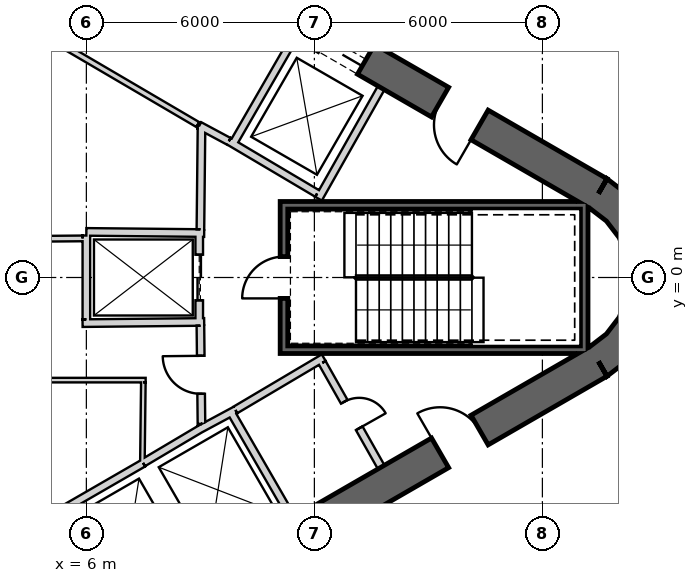
"""IFC4 building model, lengths in metres.
Left out: names, types, materials, properties, quantities, classifications, styles, units other than length and angle.
Written with IfcOpenShell. Run it as: python <this file> out.ifc"""

import sys

from ifc_helpers import new_model, si_unit, direction, frame, frame_2d, origin, place, context, subcontext, project, spatial, polyline, rectangle, outline, extrude, element, fill, save


model = new_model("IFC4")
c1 = context("Model", 3, precision=1e-05, world=origin(), true_north=direction((0.0, 1.0)))
c2 = subcontext(c1, "Body", "Model", "MODEL_VIEW")
j1 = project(units=[si_unit("LENGTHUNIT", "METRE"), si_unit("PLANEANGLEUNIT", "RADIAN")], contexts=[c1])
p1 = place(None, origin())
s1 = spatial("IfcSite", under=j1, at=p1, CompositionType="ELEMENT")
p2 = place(p1, origin())
s2 = spatial("IfcBuilding", under=s1, at=p2, CompositionType="ELEMENT")
p3 = place(p2, frame((0.0, 0.0, 181.2)))
s3 = spatial("IfcBuildingStorey", under=s2, at=p3, CompositionType="ELEMENT", Elevation=181.2)
p4 = place(p3, frame((19.475, 2.208, 0.0), z_axis=(0.0, 0.0, 1.0), x_axis=(-0.866028369851, 0.499994862586, 0.0)))
e1 = element("IfcWall", 1, at=p4, inside=s3, PredefinedType="SHEAR", context=c2, shape_type="SweptSolid", body=[
    extrude(rectangle(XDim=31.523, YDim=0.9, at=frame_2d((15.762, 0.0))), origin(), (0.0, 0.0, 1.0), 4.0),
])
p5 = place(p4, frame((7.062, 0.0, 0.0)))
e2 = element("IfcOpeningElement", 2, at=p5, cuts=e1, PredefinedType="OPENING", context=c2, shape_type="SweptSolid", body=[
    extrude(rectangle(XDim=1.2, YDim=2.4, at=frame_2d((0.6, 1.2))), frame((0.0, 0.46, 0.0), z_axis=(0.0, -1.0, 0.0), x_axis=(1.0, 0.0, 0.0)), (0.0, 0.0, 1.0), 0.92),
])
p6 = place(p4, frame((3.612, 0.0, 0.0)))
e3 = element("IfcOpeningElement", 3, at=p6, cuts=e1, PredefinedType="OPENING", context=c2, shape_type="SweptSolid", body=[
    extrude(rectangle(XDim=1.2, YDim=2.4, at=frame_2d((0.6, 1.2))), frame((0.0, 0.46, 0.0), z_axis=(0.0, -1.0, 0.0), x_axis=(1.0, 0.0, 0.0)), (0.0, 0.0, 1.0), 0.92),
])
p7 = place(p4, frame((26.712, 0.0, 0.0)))
e4 = element("IfcOpeningElement", 4, at=p7, cuts=e1, PredefinedType="OPENING", context=c2, shape_type="SweptSolid", body=[
    extrude(rectangle(XDim=1.2, YDim=2.4, at=frame_2d((0.6, 1.2))), frame((0.0, 0.46, 0.0), z_axis=(0.0, -1.0, 0.0), x_axis=(1.0, 0.0, 0.0)), (0.0, 0.0, 1.0), 0.92),
])
p8 = place(p3, frame((-7.825, -17.97, 0.0), z_axis=(0.0, 0.0, 1.0), x_axis=(0.866028369851, 0.499994862586, 0.0)))
e5 = element("IfcWall", 5, at=p8, inside=s3, PredefinedType="SHEAR", context=c2, shape_type="SweptSolid", body=[
    extrude(rectangle(XDim=31.523, YDim=0.9, at=frame_2d((15.762, 0.0))), origin(), (0.0, 0.0, 1.0), 4.0),
])
p9 = place(p8, frame((7.062, 0.0, 0.0)))
e6 = element("IfcOpeningElement", 6, at=p9, cuts=e5, PredefinedType="OPENING", context=c2, shape_type="SweptSolid", body=[
    extrude(rectangle(XDim=1.2, YDim=2.4, at=frame_2d((0.6, 1.2))), frame((0.0, 0.46, 0.0), z_axis=(0.0, -1.0, 0.0), x_axis=(1.0, 0.0, 0.0)), (0.0, 0.0, 1.0), 0.92),
])
p10 = place(p8, frame((9.762, 0.0, 0.0)))
e7 = element("IfcOpeningElement", 7, at=p10, cuts=e5, PredefinedType="OPENING", context=c2, shape_type="SweptSolid", body=[
    extrude(rectangle(XDim=1.2, YDim=2.4, at=frame_2d((0.6, 1.2))), frame((0.0, 0.46, 0.0), z_axis=(0.0, -1.0, 0.0), x_axis=(1.0, 0.0, 0.0)), (0.0, 0.0, 1.0), 0.92),
])
p11 = place(p8, frame((12.462, 0.0, 0.0)))
e8 = element("IfcOpeningElement", 8, at=p11, cuts=e5, PredefinedType="OPENING", context=c2, shape_type="SweptSolid", body=[
    extrude(rectangle(XDim=1.2, YDim=2.4, at=frame_2d((0.6, 1.2))), frame((0.0, 0.46, 0.0), z_axis=(0.0, -1.0, 0.0), x_axis=(1.0, 0.0, 0.0)), (0.0, 0.0, 1.0), 0.92),
])
p12 = place(p8, frame((15.162, 0.0, 0.0)))
e9 = element("IfcOpeningElement", 9, at=p12, cuts=e5, PredefinedType="OPENING", context=c2, shape_type="SweptSolid", body=[
    extrude(rectangle(XDim=1.2, YDim=2.4, at=frame_2d((0.6, 1.2))), frame((0.0, 0.46, 0.0), z_axis=(0.0, -1.0, 0.0), x_axis=(1.0, 0.0, 0.0)), (0.0, 0.0, 1.0), 0.92),
])
p13 = place(p8, frame((17.862, 0.0, 0.0)))
e10 = element("IfcOpeningElement", 10, at=p13, cuts=e5, PredefinedType="OPENING", context=c2, shape_type="SweptSolid", body=[
    extrude(rectangle(XDim=1.2, YDim=2.4, at=frame_2d((0.6, 1.2))), frame((0.0, 0.46, 0.0), z_axis=(0.0, -1.0, 0.0), x_axis=(1.0, 0.0, 0.0)), (0.0, 0.0, 1.0), 0.92),
])
p14 = place(p8, frame((20.562, 0.0, 0.0)))
e11 = element("IfcOpeningElement", 11, at=p14, cuts=e5, PredefinedType="OPENING", context=c2, shape_type="SweptSolid", body=[
    extrude(rectangle(XDim=1.2, YDim=2.4, at=frame_2d((0.6, 1.2))), frame((0.0, 0.46, 0.0), z_axis=(0.0, -1.0, 0.0), x_axis=(1.0, 0.0, 0.0)), (0.0, 0.0, 1.0), 0.92),
])
p15 = place(p8, frame((26.712, 0.0, 0.0)))
e12 = element("IfcOpeningElement", 12, at=p15, cuts=e5, PredefinedType="OPENING", context=c2, shape_type="SweptSolid", body=[
    extrude(rectangle(XDim=1.2, YDim=2.4, at=frame_2d((0.6, 1.2))), frame((0.0, 0.46, 0.0), z_axis=(0.0, -1.0, 0.0), x_axis=(1.0, 0.0, 0.0)), (0.0, 0.0, 1.0), 0.92),
])
p16 = place(p8, frame((3.612, 0.0, 0.0)))
e13 = element("IfcOpeningElement", 13, at=p16, cuts=e5, PredefinedType="OPENING", context=c2, shape_type="SweptSolid", body=[
    extrude(rectangle(XDim=1.2, YDim=2.4, at=frame_2d((0.6, 1.2))), frame((0.0, 0.46, 0.0), z_axis=(0.0, -1.0, 0.0), x_axis=(1.0, 0.0, 0.0)), (0.0, 0.0, 1.0), 0.92),
])
p17 = place(p3, origin())
e14 = element("IfcWall", 14, at=p17, inside=s3, PredefinedType="SHEAR", context=c2, shape_type="SweptSolid", body=[
    extrude(outline(polyline([(19.7, -2.598), (20.321, -2.121), (20.798, -1.5), (21.098, -0.777), (21.2, 0.0), (21.098, 0.777), (20.798, 1.5), (20.321, 2.121), (19.7, 2.598), (19.25, 1.819), (19.685, 1.485), (20.019, 1.05), (20.229, 0.543), (20.3, 0.0), (20.229, -0.543), (20.019, -1.05), (19.685, -1.485), (19.25, -1.819), (19.7, -2.598)])), origin(), (0.0, 0.0, 1.0), 4.0),
])
p18 = place(p3, frame((9.847, 3.495, 0.0), z_axis=(0.0, 0.0, 1.0), x_axis=(0.499984717929, 0.866034226713, 0.0)))
e15 = element("IfcWall", 15, at=p18, inside=s3, PredefinedType="PLUMBINGWALL", context=c2, shape_type="SweptSolid", body=[
    extrude(rectangle(XDim=3.25, YDim=0.2, at=frame_2d((1.625, 0.0))), origin(), (0.0, 0.0, 1.0), 3.7),
])
p19 = place(p3, frame((12.11, 2.073, 0.0), z_axis=(0.0, 0.0, 1.0), x_axis=(0.49196600604, 0.870614408852, 0.0)))
e16 = element("IfcWall", 16, at=p19, inside=s3, PredefinedType="PLUMBINGWALL", context=c2, shape_type="SweptSolid", body=[
    extrude(rectangle(XDim=3.35, YDim=0.2, at=frame_2d((1.675, 0.0))), origin(), (0.0, 0.0, 1.0), 3.7),
])
p20 = place(p3, frame((12.073, 2.211, 0.0), z_axis=(0.0, 0.0, 1.0), x_axis=(-0.860414880418, 0.509594185166, 0.0)))
e17 = element("IfcWall", 17, at=p20, inside=s3, PredefinedType="PLUMBINGWALL", context=c2, shape_type="SweptSolid", body=[
    extrude(rectangle(XDim=2.7, YDim=0.2, at=frame_2d((1.35, 0.0))), origin(), (0.0, 0.0, 1.0), 3.7),
])
p21 = place(p3, frame((0.483, -8.936, 0.0), z_axis=(0.0, 0.0, 1.0), x_axis=(0.866030989016, 0.499990325971, 0.0)))
e18 = element("IfcWall", 18, at=p21, inside=s3, PredefinedType="PLUMBINGWALL", context=c2, shape_type="SweptSolid", body=[
    extrude(rectangle(XDim=8.1, YDim=0.2, at=frame_2d((4.05, 0.0))), origin(), (0.0, 0.0, 1.0), 3.7),
])
p22 = place(p3, frame((9.795, -3.525, 0.0), z_axis=(0.0, 0.0, 1.0), x_axis=(0.499984717929, -0.866034226713, 0.0)))
e19 = element("IfcWall", 19, at=p22, inside=s3, PredefinedType="PLUMBINGWALL", context=c2, shape_type="SweptSolid", body=[
    extrude(rectangle(XDim=3.25, YDim=0.2, at=frame_2d((1.625, 0.0))), origin(), (0.0, 0.0, 1.0), 3.7),
])
p23 = place(p3, frame((8.974, -3.999, 0.0), z_axis=(0.0, 0.0, 1.0), x_axis=(0.880907015104, 0.473289373154, 0.0)))
e20 = element("IfcWall", 20, at=p23, inside=s3, PredefinedType="PLUMBINGWALL", context=c2, shape_type="SweptSolid", body=[
    extrude(rectangle(XDim=1.078, YDim=0.2, at=frame_2d((0.539, 0.0))), origin(), (0.0, 0.0, 1.0), 3.7),
])
p24 = place(p3, frame((7.493, -4.878, 0.0), z_axis=(0.0, 0.0, 1.0), x_axis=(0.859981807212, 0.510324691999, 0.0)))
e21 = element("IfcWall", 21, at=p24, inside=s3, PredefinedType="PLUMBINGWALL", context=c2, shape_type="SweptSolid", body=[
    extrude(rectangle(XDim=1.845, YDim=0.2, at=frame_2d((0.922, 0.0))), origin(), (0.0, 0.0, 1.0), 3.7),
])
p25 = place(p3, frame((19.2, 1.9, -0.3), z_axis=(0.0, 0.0, 1.0), x_axis=(-1.0, 0.0, 0.0)))
e22 = element("IfcWall", 22, at=p25, inside=s3, PredefinedType="SHEAR", context=c2, shape_type="SweptSolid", body=[
    extrude(rectangle(XDim=8.1, YDim=0.2, at=frame_2d((4.05, 0.0))), origin(), (0.0, 0.0, 1.0), 4.0),
])
p26 = place(p3, frame((19.1, -2.0, -0.3), z_axis=(0.0, 0.0, 1.0), x_axis=(0.0, 1.0, 0.0)))
e23 = element("IfcWall", 23, at=p26, inside=s3, PredefinedType="SHEAR", context=c2, shape_type="SweptSolid", body=[
    extrude(rectangle(XDim=3.8, YDim=0.2, at=frame_2d((1.9, 0.0))), origin(), (0.0, 0.0, 1.0), 4.0),
])
p27 = place(p3, frame((11.1, -1.9, -0.3), z_axis=(0.0, 0.0, 1.0), x_axis=(1.0, 0.0, 0.0)))
e24 = element("IfcWall", 24, at=p27, inside=s3, PredefinedType="SHEAR", context=c2, shape_type="SweptSolid", body=[
    extrude(rectangle(XDim=7.9, YDim=0.2, at=frame_2d((3.95, 0.0))), origin(), (0.0, 0.0, 1.0), 4.0),
])
p28 = place(p3, frame((11.2, -1.8, -0.3), z_axis=(0.0, 0.0, 1.0), x_axis=(0.0, 1.0, 0.0)))
e25 = element("IfcWall", 25, at=p28, inside=s3, PredefinedType="SHEAR", context=c2, shape_type="SweptSolid", body=[
    extrude(rectangle(XDim=3.6, YDim=0.2, at=frame_2d((1.8, 0.0))), origin(), (0.0, 0.0, 1.0), 4.0),
])
p29 = place(p28, frame((1.25, 0.0, 0.3)))
e26 = element("IfcOpeningElement", 26, at=p29, cuts=e25, PredefinedType="OPENING", context=c2, shape_type="SweptSolid", body=[
    extrude(rectangle(XDim=1.1, YDim=2.1, at=frame_2d((0.55, 1.05))), frame((0.0, 0.11, 0.0), z_axis=(0.0, -1.0, 0.0), x_axis=(1.0, 0.0, 0.0)), (0.0, 0.0, 1.0), 0.22),
])
p30 = place(p3, frame((8.97, 1.2, 0.0), z_axis=(0.0, 0.0, 1.0), x_axis=(0.0, -1.0, 0.0)))
e27 = element("IfcWall", 27, at=p30, inside=s3, PredefinedType="PLUMBINGWALL", context=c2, shape_type="SweptSolid", body=[
    extrude(rectangle(XDim=2.4, YDim=0.2, at=frame_2d((1.2, 0.0))), origin(), (0.0, 0.0, 1.0), 3.7),
])
p31 = place(p30, frame((0.6, 0.0, 0.0)))
e28 = element("IfcOpeningElement", 28, at=p31, cuts=e27, PredefinedType="OPENING", context=c2, shape_type="SweptSolid", body=[
    extrude(rectangle(XDim=1.2, YDim=2.4, at=frame_2d((0.6, 1.2))), frame((0.0, 0.11, 0.0), z_axis=(0.0, -1.0, 0.0), x_axis=(1.0, 0.0, 0.0)), (0.0, 0.0, 1.0), 0.22),
])
p32 = place(p3, frame((6.0, 1.2, 0.0), z_axis=(0.0, 0.0, 1.0), x_axis=(0.999949988, -0.010001074852, 0.0)))
e29 = element("IfcWall", 29, at=p32, inside=s3, PredefinedType="PLUMBINGWALL", context=c2, shape_type="SweptSolid", body=[
    extrude(rectangle(XDim=3.1, YDim=0.2, at=frame_2d((1.55, 0.0))), origin(), (0.0, 0.0, 1.0), 3.7),
])
p33 = place(p3, frame((5.9, -1.201, 0.0), z_axis=(0.0, 0.0, 1.0), x_axis=(0.999950064753, 0.009993397809, 0.0)))
e30 = element("IfcWall", 30, at=p33, inside=s3, PredefinedType="PLUMBINGWALL", context=c2, shape_type="SweptSolid", body=[
    extrude(rectangle(XDim=3.2, YDim=0.2, at=frame_2d((1.6, 0.0))), origin(), (0.0, 0.0, 1.0), 3.7),
])
p34 = place(p3, frame((6.0, -1.1, 0.0), z_axis=(0.0, 0.0, 1.0), x_axis=(0.0, 1.0, 0.0)))
e31 = element("IfcWall", 31, at=p34, inside=s3, PredefinedType="PLUMBINGWALL", context=c2, shape_type="SweptSolid", body=[
    extrude(rectangle(XDim=2.205, YDim=0.2, at=frame_2d((1.102, 0.0))), origin(), (0.0, 0.0, 1.0), 3.7),
])
p35 = place(p3, frame((8.974, 3.999, 0.0), z_axis=(0.0, 0.0, 1.0), x_axis=(0.880917147855, -0.473270513147, 0.0)))
e32 = element("IfcWall", 32, at=p35, inside=s3, PredefinedType="PARTITIONING", context=c2, shape_type="SweptSolid", body=[
    extrude(rectangle(XDim=0.878, YDim=0.2, at=frame_2d((0.439, 0.0))), origin(), (0.0, 0.0, 1.0), 3.7),
])
p36 = place(p3, frame((8.931, 4.025, 0.0), z_axis=(0.0, 0.0, 1.0), x_axis=(-0.862666884027, 0.505772525157, 0.0)))
e33 = element("IfcWall", 33, at=p36, inside=s3, PredefinedType="PLUMBINGWALL", context=c2, shape_type="SweptSolid", body=[
    extrude(rectangle(XDim=4.372, YDim=0.15, at=frame_2d((2.186, 0.0))), origin(), (0.0, 0.0, 1.0), 3.7),
])
p37 = place(p3, frame((12.245, -2.109, 0.0), z_axis=(0.0, 0.0, 1.0), x_axis=(-0.860414880418, -0.509594185166, 0.0)))
e34 = element("IfcWall", 34, at=p37, inside=s3, PredefinedType="PARTITIONING", context=c2, shape_type="SweptSolid", body=[
    extrude(rectangle(XDim=2.7, YDim=0.2, at=frame_2d((1.35, 0.0))), origin(), (0.0, 0.0, 1.0), 3.7),
])
p38 = place(p3, frame((13.758, -4.99, 0.0), z_axis=(0.0, 0.0, 1.0), x_axis=(-0.491993409184, 0.87059892334, 0.0)))
e35 = element("IfcWall", 35, at=p38, inside=s3, PredefinedType="PARTITIONING", context=c2, shape_type="SweptSolid", body=[
    extrude(rectangle(XDim=3.15, YDim=0.2, at=frame_2d((1.575, 0.0))), origin(), (0.0, 0.0, 1.0), 3.7),
])
p39 = place(p38, frame((1.175, 0.0, 0.0)))
e36 = element("IfcOpeningElement", 36, at=p39, cuts=e35, PredefinedType="OPENING", context=c2, shape_type="SweptSolid", body=[
    extrude(rectangle(XDim=0.8, YDim=2.1, at=frame_2d((0.4, 1.05))), frame((0.0, 0.11, 0.0), z_axis=(0.0, -1.0, 0.0), x_axis=(1.0, 0.0, 0.0)), (0.0, 0.0, 1.0), 0.22),
])
p40 = place(p3, frame((9.001, 1.27, 0.0), z_axis=(0.0, 0.0, 1.0), x_axis=(0.01074821465, 0.999942236273, 0.0)))
e37 = element("IfcWall", 37, at=p40, inside=s3, PredefinedType="PARTITIONING", context=c2, shape_type="SweptSolid", body=[
    extrude(rectangle(XDim=2.726, YDim=0.2, at=frame_2d((1.363, 0.0))), origin(), (0.0, 0.0, 1.0), 3.7),
])
p41 = place(p3, frame((9.029, -3.851, 0.0), z_axis=(0.0, 0.0, 1.0), x_axis=(-0.010783593937, 0.99994185536, 0.0)))
e38 = element("IfcWall", 38, at=p41, inside=s3, PredefinedType="PARTITIONING", context=c2, shape_type="SweptSolid", body=[
    extrude(rectangle(XDim=2.581, YDim=0.2, at=frame_2d((1.291, 0.0))), origin(), (0.0, 0.0, 1.0), 3.7),
])
p42 = place(p41, frame((0.791, 0.0, 0.0)))
e39 = element("IfcOpeningElement", 39, at=p42, cuts=e38, PredefinedType="OPENING", context=c2, shape_type="SweptSolid", body=[
    extrude(rectangle(XDim=1.0, YDim=2.1, at=frame_2d((0.5, 1.05))), frame((0.0, 0.11, 0.0), z_axis=(0.0, -1.0, 0.0), x_axis=(1.0, 0.0, 0.0)), (0.0, 0.0, 1.0), 0.22),
])
p43 = place(p3, frame((2.384, 0.999, 0.0), z_axis=(0.0, 0.0, 1.0), x_axis=(0.999964703434, 0.008401897723, 0.0)))
e40 = element("IfcWall", 40, at=p43, inside=s3, PredefinedType="PLUMBINGWALL", context=c2, shape_type="SweptSolid", body=[
    extrude(rectangle(XDim=3.516, YDim=0.15, at=frame_2d((1.758, 0.0))), origin(), (0.0, 0.0, 1.0), 3.7),
])
p44 = place(p43, frame((1.422, 0.0, 0.0)))
e41 = element("IfcOpeningElement", 41, at=p44, cuts=e40, PredefinedType="OPENING", context=c2, shape_type="SweptSolid", body=[
    extrude(rectangle(XDim=0.8, YDim=2.1, at=frame_2d((0.4, 1.05))), frame((0.0, 0.085, 0.0), z_axis=(0.0, -1.0, 0.0), x_axis=(1.0, 0.0, 0.0)), (0.0, 0.0, 1.0), 0.17),
])
p45 = place(p3, frame((7.56, -2.7, 0.0), z_axis=(0.0, 0.0, 1.0), x_axis=(-1.0, 0.0, 0.0)))
e42 = element("IfcWall", 42, at=p45, inside=s3, PredefinedType="PARTITIONING", context=c2, shape_type="SweptSolid", body=[
    extrude(rectangle(XDim=3.0, YDim=0.12, at=frame_2d((1.5, 0.0))), origin(), (0.0, 0.0, 1.0), 3.7),
])
p46 = place(p3, frame((7.475, -4.865, 0.0), z_axis=(0.0, 0.0, 1.0), x_axis=(0.011716133148, 0.999931363757, 0.0)))
e43 = element("IfcWall", 43, at=p46, inside=s3, PredefinedType="PARTITIONING", context=c2, shape_type="SweptSolid", body=[
    extrude(rectangle(XDim=2.105, YDim=0.12, at=frame_2d((1.052, 0.0))), origin(), (0.0, 0.0, 1.0), 3.7),
])
p47 = place(p29, origin())
e44 = element("IfcDoor", 44, at=p47, inside=s3, OperationType="SINGLE_SWING_RIGHT", PredefinedType="USERDEFINED", context=c2, shape_type="SweptSolid", body=[
    extrude(rectangle(XDim=1.1, YDim=2.1, at=frame_2d((0.55, 1.05))), frame((0.0, 0.025, 0.0), z_axis=(0.0, -1.0, 0.0), x_axis=(1.0, 0.0, 0.0)), (0.0, 0.0, 1.0), 0.05),
])
fill(e26, e44)
p48 = place(p42, origin())
e45 = element("IfcDoor", 45, at=p48, inside=s3, OperationType="SINGLE_SWING_RIGHT", PredefinedType="USERDEFINED", context=c2, shape_type="SweptSolid", body=[
    extrude(rectangle(XDim=1.0, YDim=2.1, at=frame_2d((0.5, 1.05))), frame((0.0, 0.025, 0.0), z_axis=(0.0, -1.0, 0.0), x_axis=(1.0, 0.0, 0.0)), (0.0, 0.0, 1.0), 0.05),
])
fill(e39, e45)
p49 = place(p31, origin())
e46 = element("IfcDoor", 46, at=p49, inside=s3, OperationType="SLIDING_TO_LEFT", PredefinedType="USERDEFINED", context=c2, shape_type="SweptSolid", body=[
    extrude(rectangle(XDim=1.2, YDim=2.4, at=frame_2d((0.6, 1.2))), frame((0.0, 0.025, 0.0), z_axis=(0.0, -1.0, 0.0), x_axis=(1.0, 0.0, 0.0)), (0.0, 0.0, 1.0), 0.05),
])
fill(e28, e46)
p50 = place(p39, origin())
e47 = element("IfcDoor", 47, at=p50, inside=s3, OperationType="SINGLE_SWING_RIGHT", PredefinedType="USERDEFINED", context=c2, shape_type="SweptSolid", body=[
    extrude(rectangle(XDim=0.8, YDim=2.1, at=frame_2d((0.4, 1.05))), frame((0.0, 0.025, 0.0), z_axis=(0.0, -1.0, 0.0), x_axis=(1.0, 0.0, 0.0)), (0.0, 0.0, 1.0), 0.05),
])
fill(e36, e47)
p51 = place(p5, origin())
e48 = element("IfcDoor", 48, at=p51, inside=s3, OperationType="SLIDING_TO_LEFT", PredefinedType="USERDEFINED", context=c2, shape_type="SweptSolid", body=[
    extrude(rectangle(XDim=1.2, YDim=2.4, at=frame_2d((0.6, 1.2))), frame((0.0, 0.025, 0.0), z_axis=(0.0, -1.0, 0.0), x_axis=(1.0, 0.0, 0.0)), (0.0, 0.0, 1.0), 0.05),
])
fill(e2, e48)
p52 = place(p15, origin())
e49 = element("IfcDoor", 49, at=p52, inside=s3, OperationType="SINGLE_SWING_RIGHT", PredefinedType="USERDEFINED", context=c2, shape_type="SweptSolid", body=[
    extrude(rectangle(XDim=1.2, YDim=2.4, at=frame_2d((0.6, 1.2))), frame((0.0, 0.025, 0.0), z_axis=(0.0, -1.0, 0.0), x_axis=(1.0, 0.0, 0.0)), (0.0, 0.0, 1.0), 0.05),
])
fill(e12, e49)
p53 = place(p6, origin())
e50 = element("IfcDoor", 50, at=p53, inside=s3, OperationType="SINGLE_SWING_LEFT", PredefinedType="USERDEFINED", context=c2, shape_type="SweptSolid", body=[
    extrude(rectangle(XDim=1.2, YDim=2.4, at=frame_2d((0.6, 1.2))), frame((0.0, 0.025, 0.0), z_axis=(0.0, -1.0, 0.0), x_axis=(1.0, 0.0, 0.0)), (0.0, 0.0, 1.0), 0.05),
])
fill(e3, e50)
save(model, sys.argv[1])
